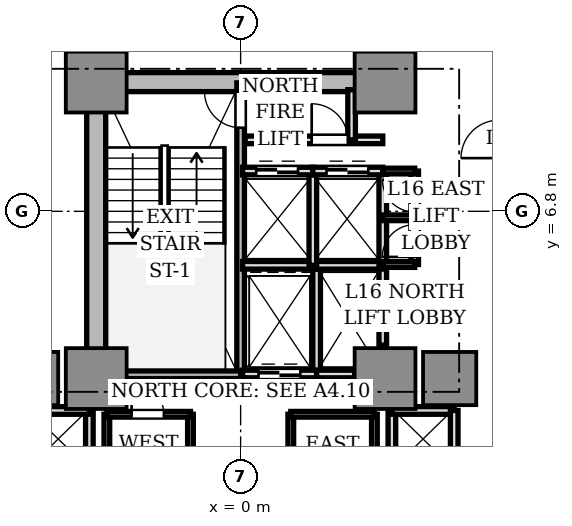
"""IFC4 building model, lengths in metres.
Left out: names, types, materials, properties, quantities, classifications, styles, units other than length and angle.
Written with IfcOpenShell. Run it as: python <this file> out.ifc"""

import sys

from ifc_helpers import new_model, si_unit, direction, frame, frame_2d, origin, origin_2d, place, context, subcontext, project, spatial, rectangle, extrude, source, transform, mapped, element, fill, save


model = new_model("IFC4")
c1 = context("Model", 3, precision=1e-05, world=origin(), true_north=direction((0.0, 1.0)))
c2 = subcontext(c1, "Body", "Model", "MODEL_VIEW")
j1 = project(units=[si_unit("LENGTHUNIT", "METRE"), si_unit("PLANEANGLEUNIT", "RADIAN")], contexts=[c1])
p1 = place(None, origin())
s1 = spatial("IfcSite", under=j1, at=p1, CompositionType="ELEMENT")
p2 = place(p1, origin())
s2 = spatial("IfcBuilding", under=s1, at=p2, CompositionType="ELEMENT")
p3 = place(p2, frame((0.0, 0.0, 61.1)))
s3 = spatial("IfcBuildingStorey", under=s2, at=p3, CompositionType="ELEMENT", Elevation=61.1)
p4 = place(p3, frame((-3.55, 10.2, 0.0), z_axis=(0.0, 0.0, 1.0), x_axis=(1.0, 0.0, 0.0)))
e1 = element("IfcWall", 1, at=p4, inside=s3, PredefinedType="SHEAR", context=c2, shape_type="SweptSolid", body=[
    extrude(rectangle(XDim=7.1, YDim=0.5, at=frame_2d((3.55, 0.0))), origin(), (0.0, 0.0, 1.0), 3.11),
])
p5 = place(p3, frame((-3.8, 2.85, 0.0), z_axis=(0.0, 0.0, 1.0), x_axis=(0.0, 1.0, 0.0)))
e2 = element("IfcWall", 2, at=p5, inside=s3, PredefinedType="SHEAR", context=c2, shape_type="SweptSolid", body=[
    extrude(rectangle(XDim=6.9, YDim=0.5, at=frame_2d((3.45, 0.0))), origin(), (0.0, 0.0, 1.0), 3.11),
])
m1 = source(origin(), c2, "Body", "SweptSolid", [
    extrude(rectangle(XDim=1.6, YDim=1.6, at=origin_2d()), origin(), (0.0, 0.0, 1.0), 3.11),
])
for number, where, z_axis, x_axis in (
    (3, (-3.8, 2.4, 0.0), (0.0, 0.0, 1.0), (1.0, 0.0, 0.0)),
    (4, (3.8, 2.4, 0.0), (0.0, 0.0, 1.0), (1.0, 0.0, 0.0)),
    (5, (-3.8, 10.2, 0.0), (0.0, 0.0, 1.0), (1.0, 0.0, 0.0)),
    (6, (3.8, 10.2, 0.0), (0.0, 0.0, 1.0), (1.0, 0.0, 0.0)),
):
    element("IfcColumn", number, at=place(p3, frame(where, z_axis=z_axis, x_axis=x_axis)), inside=s3, PredefinedType="COLUMN", context=c2, shape_type="MappedRepresentation", body=[
        mapped(m1, transform((0.0, 0.0, 0.0), scale=1.0)),
    ])
m2 = source(origin(), c2, "Body", "SweptSolid", [
    extrude(rectangle(XDim=1.4, YDim=1.4, at=origin_2d()), origin(), (0.0, 0.0, 1.0), 3.11),
])
for number, where, z_axis, x_axis in (
    (7, (5.5, 2.4, 0.0), (0.0, 0.0, 1.0), (1.0, 0.0, 0.0)),
    (8, (-5.5, 2.4, 0.0), (0.0, 0.0, 1.0), (1.0, 0.0, 0.0)),
):
    element("IfcColumn", number, at=place(p3, frame(where, z_axis=z_axis, x_axis=x_axis)), inside=s3, PredefinedType="COLUMN", context=c2, shape_type="MappedRepresentation", body=[
        mapped(m2, transform((0.0, 0.0, 0.0), scale=1.0)),
    ])
p6 = place(p3, frame((0.0, 2.5, 0.0), z_axis=(0.0, 0.0, 1.0), x_axis=(0.0, 1.0, 0.0)))
e9 = element("IfcWall", 9, at=p6, inside=s3, PredefinedType="SOLIDWALL", context=c2, shape_type="SweptSolid", body=[
    extrude(rectangle(XDim=7.68, YDim=0.2, at=frame_2d((3.84, 0.0))), origin(), (0.0, 0.0, 1.0), 3.11),
])
p7 = place(p6, frame((6.5, 0.0, 0.0)))
e10 = element("IfcOpeningElement", 10, at=p7, cuts=e9, PredefinedType="OPENING", context=c2, shape_type="SweptSolid", body=[
    extrude(rectangle(XDim=0.95, YDim=2.15, at=frame_2d((0.475, 1.075))), frame((0.0, 0.11, 0.0), z_axis=(0.0, -1.0, 0.0), x_axis=(1.0, 0.0, 0.0)), (0.0, 0.0, 1.0), 0.22),
])
p8 = place(p3, frame((-3.72, 2.5, 0.0), z_axis=(0.0, 0.0, 1.0), x_axis=(1.0, 0.0, 0.0)))
e11 = element("IfcWall", 11, at=p8, inside=s3, PredefinedType="SOLIDWALL", context=c2, shape_type="SweptSolid", body=[
    extrude(rectangle(XDim=3.72, YDim=0.2, at=frame_2d((1.86, 0.0))), origin(), (0.0, 0.0, 1.0), 3.11),
])
p9 = place(p3, frame((2.0, 2.5, 0.0), z_axis=(0.0, 0.0, 1.0), x_axis=(0.0, 1.0, 0.0)))
e12 = element("IfcWall", 12, at=p9, inside=s3, PredefinedType="SOLIDWALL", context=c2, shape_type="SweptSolid", body=[
    extrude(rectangle(XDim=2.78, YDim=0.2, at=frame_2d((1.39, 0.0))), origin(), (0.0, 0.0, 1.0), 2.66),
])
p10 = place(p3, frame((0.05, 2.52, 0.0), z_axis=(0.0, 0.0, 1.0), x_axis=(1.0, 0.0, 0.0)))
e13 = element("IfcWall", 13, at=p10, inside=s3, PredefinedType="SOLIDWALL", context=c2, shape_type="SweptSolid", body=[
    extrude(rectangle(XDim=1.95, YDim=0.2, at=frame_2d((0.975, 0.0))), origin(), (0.0, 0.0, 1.0), 2.66),
])
p11 = place(p10, frame((0.42, 0.0, 0.0)))
e14 = element("IfcOpeningElement", 14, at=p11, cuts=e13, PredefinedType="OPENING", context=c2, shape_type="SweptSolid", body=[
    extrude(rectangle(XDim=1.1, YDim=2.2, at=frame_2d((0.55, 1.1))), frame((0.0, 0.11, 0.0), z_axis=(0.0, -1.0, 0.0), x_axis=(1.0, 0.0, 0.0)), (0.0, 0.0, 1.0), 0.22),
])
p12 = place(p3, frame((2.0, 2.52, 0.0), z_axis=(0.0, 0.0, 1.0), x_axis=(1.0, 0.0, 0.0)))
e15 = element("IfcWall", 15, at=p12, inside=s3, PredefinedType="SOLIDWALL", context=c2, shape_type="SweptSolid", body=[
    extrude(rectangle(XDim=1.0, YDim=0.2, at=frame_2d((0.5, 0.0))), origin(), (0.0, 0.0, 1.0), 2.66),
])
p13 = place(p3, frame((3.74, 3.28, 0.0), z_axis=(0.0, 0.0, 1.0), x_axis=(0.0, 1.0, 0.0)))
e16 = element("IfcWall", 16, at=p13, inside=s3, PredefinedType="SOLIDWALL", context=c2, shape_type="SweptSolid", body=[
    extrude(rectangle(XDim=2.08, YDim=0.2, at=frame_2d((1.04, 0.0))), origin(), (0.0, 0.0, 1.0), 2.66),
])
p14 = place(p13, frame((0.44, 0.0, 0.0)))
e17 = element("IfcOpeningElement", 17, at=p14, cuts=e16, PredefinedType="OPENING", context=c2, shape_type="SweptSolid", body=[
    extrude(rectangle(XDim=1.2, YDim=2.2, at=frame_2d((0.6, 1.1))), frame((0.0, 0.11, 0.0), z_axis=(0.0, -1.0, 0.0), x_axis=(1.0, 0.0, 0.0)), (0.0, 0.0, 1.0), 0.22),
])
p15 = place(p3, frame((0.05, 5.38, 0.0), z_axis=(0.0, 0.0, 1.0), x_axis=(1.0, 0.0, 0.0)))
e18 = element("IfcWall", 18, at=p15, inside=s3, PredefinedType="SOLIDWALL", context=c2, shape_type="SweptSolid", body=[
    extrude(rectangle(XDim=3.69, YDim=0.2, at=frame_2d((1.845, 0.0))), origin(), (0.0, 0.0, 1.0), 2.66),
])
p16 = place(p3, frame((1.9, 5.38, 0.0), z_axis=(0.0, 0.0, 1.0), x_axis=(0.0, 1.0, 0.0)))
e19 = element("IfcWall", 19, at=p16, inside=s3, PredefinedType="SOLIDWALL", context=c2, shape_type="SweptSolid", body=[
    extrude(rectangle(XDim=2.48, YDim=0.2, at=frame_2d((1.24, 0.0))), origin(), (0.0, 0.0, 1.0), 2.66),
])
p17 = place(p3, frame((0.05, 7.86, 0.0), z_axis=(0.0, 0.0, 1.0), x_axis=(1.0, 0.0, 0.0)))
e20 = element("IfcWall", 20, at=p17, inside=s3, PredefinedType="SOLIDWALL", context=c2, shape_type="SweptSolid", body=[
    extrude(rectangle(XDim=1.85, YDim=0.2, at=frame_2d((0.925, 0.0))), origin(), (0.0, 0.0, 1.0), 2.66),
])
p18 = place(p17, frame((0.36, 0.0, 0.0)))
e21 = element("IfcOpeningElement", 21, at=p18, cuts=e20, PredefinedType="OPENING", context=c2, shape_type="SweptSolid", body=[
    extrude(rectangle(XDim=1.1, YDim=2.2, at=frame_2d((0.55, 1.1))), frame((0.0, 0.11, 0.0), z_axis=(0.0, -1.0, 0.0), x_axis=(1.0, 0.0, 0.0)), (0.0, 0.0, 1.0), 0.22),
])
p19 = place(p3, frame((3.74, 5.38, 0.0), z_axis=(0.0, 0.0, 1.0), x_axis=(0.0, 1.0, 0.0)))
e22 = element("IfcWall", 22, at=p19, inside=s3, PredefinedType="SOLIDWALL", context=c2, shape_type="SweptSolid", body=[
    extrude(rectangle(XDim=2.48, YDim=0.2, at=frame_2d((1.24, 0.0))), origin(), (0.0, 0.0, 1.0), 2.66),
])
p20 = place(p3, frame((1.9, 7.86, 0.0), z_axis=(0.0, 0.0, 1.0), x_axis=(1.0, 0.0, 0.0)))
e23 = element("IfcWall", 23, at=p20, inside=s3, PredefinedType="SOLIDWALL", context=c2, shape_type="SweptSolid", body=[
    extrude(rectangle(XDim=1.84, YDim=0.2, at=frame_2d((0.92, 0.0))), origin(), (0.0, 0.0, 1.0), 2.66),
])
p21 = place(p20, frame((0.36, 0.0, 0.0)))
e24 = element("IfcOpeningElement", 24, at=p21, cuts=e23, PredefinedType="OPENING", context=c2, shape_type="SweptSolid", body=[
    extrude(rectangle(XDim=1.1, YDim=2.2, at=frame_2d((0.55, 1.1))), frame((0.0, 0.11, 0.0), z_axis=(0.0, -1.0, 0.0), x_axis=(1.0, 0.0, 0.0)), (0.0, 0.0, 1.0), 0.22),
])
p22 = place(p3, frame((3.98, -1.56, 0.0), z_axis=(0.0, 0.0, 1.0), x_axis=(0.0, 1.0, 0.0)))
e25 = element("IfcWall", 25, at=p22, inside=s3, PredefinedType="SOLIDWALL", context=c2, shape_type="SweptSolid", body=[
    extrude(rectangle(XDim=3.12, YDim=0.2, at=frame_2d((1.56, 0.0))), origin(), (0.0, 0.0, 1.0), 2.18),
])
p23 = place(p3, frame((3.98, 1.56, 0.0), z_axis=(0.0, 0.0, 1.0), x_axis=(1.0, 0.0, 0.0)))
e26 = element("IfcWall", 26, at=p23, inside=s3, PredefinedType="SOLIDWALL", context=c2, shape_type="SweptSolid", body=[
    extrude(rectangle(XDim=1.64, YDim=0.2, at=frame_2d((0.82, 0.0))), origin(), (0.0, 0.0, 1.0), 2.66),
])
p24 = place(p3, frame((5.62, 0.0, 0.0), z_axis=(0.0, 0.0, 1.0), x_axis=(0.0, 1.0, 0.0)))
e27 = element("IfcWall", 27, at=p24, inside=s3, PredefinedType="SOLIDWALL", context=c2, shape_type="SweptSolid", body=[
    extrude(rectangle(XDim=1.56, YDim=0.2, at=frame_2d((0.78, 0.0))), origin(), (0.0, 0.0, 1.0), 2.66),
])
p25 = place(p3, frame((-3.98, -1.56, 0.0), z_axis=(0.0, 0.0, 1.0), x_axis=(0.0, 1.0, 0.0)))
e28 = element("IfcWall", 28, at=p25, inside=s3, PredefinedType="SOLIDWALL", context=c2, shape_type="SweptSolid", body=[
    extrude(rectangle(XDim=3.12, YDim=0.2, at=frame_2d((1.56, 0.0))), origin(), (0.0, 0.0, 1.0), 2.18),
])
p26 = place(p3, frame((-5.62, 1.56, 0.0), z_axis=(0.0, 0.0, 1.0), x_axis=(1.0, 0.0, 0.0)))
e29 = element("IfcWall", 29, at=p26, inside=s3, PredefinedType="SOLIDWALL", context=c2, shape_type="SweptSolid", body=[
    extrude(rectangle(XDim=1.64, YDim=0.2, at=frame_2d((0.82, 0.0))), origin(), (0.0, 0.0, 1.0), 2.66),
])
p27 = place(p3, frame((0.12, 8.68, 0.0), z_axis=(0.0, 0.0, 1.0), x_axis=(1.0, 0.0, 0.0)))
e30 = element("IfcWall", 30, at=p27, inside=s3, PredefinedType="SOLIDWALL", context=c2, shape_type="SweptSolid", body=[
    extrude(rectangle(XDim=3.62, YDim=0.2, at=frame_2d((1.81, 0.0))), origin(), (0.0, 0.0, 1.0), 2.66),
])
p28 = place(p27, frame((1.75, 0.0, 0.0)))
e31 = element("IfcOpeningElement", 31, at=p28, cuts=e30, PredefinedType="OPENING", context=c2, shape_type="SweptSolid", body=[
    extrude(rectangle(XDim=0.95, YDim=2.15, at=frame_2d((0.475, 1.075))), frame((0.0, 0.11, 0.0), z_axis=(0.0, -1.0, 0.0), x_axis=(1.0, 0.0, 0.0)), (0.0, 0.0, 1.0), 0.22),
])
p29 = place(p3, frame((2.92, 8.68, 0.0), z_axis=(0.0, 0.0, 1.0), x_axis=(0.0, 1.0, 0.0)))
e32 = element("IfcWall", 32, at=p29, inside=s3, PredefinedType="SOLIDWALL", context=c2, shape_type="SweptSolid", body=[
    extrude(rectangle(XDim=1.32, YDim=0.2, at=frame_2d((0.66, 0.0))), origin(), (0.0, 0.0, 1.0), 2.66),
])
p30 = place(p3, frame((4.58, 5.4, 0.0), z_axis=(0.0, 0.0, 1.0), x_axis=(0.0, 1.0, 0.0)))
e33 = element("IfcWall", 33, at=p30, inside=s3, PredefinedType="SOLIDWALL", context=c2, shape_type="SweptSolid", body=[
    extrude(rectangle(XDim=2.46, YDim=0.2, at=frame_2d((1.23, 0.0))), origin(), (0.0, 0.0, 1.0), 2.66),
])
p31 = place(p30, frame((0.2, 0.0, 0.0)))
e34 = element("IfcOpeningElement", 34, at=p31, cuts=e33, PredefinedType="OPENING", context=c2, shape_type="SweptSolid", body=[
    extrude(rectangle(XDim=0.85, YDim=2.1, at=frame_2d((0.425, 1.05))), frame((0.0, 0.11, 0.0), z_axis=(0.0, -1.0, 0.0), x_axis=(1.0, 0.0, 0.0)), (0.0, 0.0, 1.0), 0.22),
])
p32 = place(p30, frame((1.38, 0.0, 0.0)))
e35 = element("IfcOpeningElement", 35, at=p32, cuts=e33, PredefinedType="OPENING", context=c2, shape_type="SweptSolid", body=[
    extrude(rectangle(XDim=0.85, YDim=2.1, at=frame_2d((0.425, 1.05))), frame((0.0, 0.11, 0.0), z_axis=(0.0, -1.0, 0.0), x_axis=(1.0, 0.0, 0.0)), (0.0, 0.0, 1.0), 0.22),
])
for number, where, z_axis, x_axis in (
    (36, (3.74, 5.4, 0.0), (0.0, 0.0, 1.0), (1.0, 0.0, 0.0)),
    (37, (3.74, 7.86, 0.0), (0.0, 0.0, 1.0), (1.0, 0.0, 0.0)),
    (38, (3.74, 6.63, 0.0), (0.0, 0.0, 1.0), (1.0, 0.0, 0.0)),
):
    element("IfcWall", number, at=place(p3, frame(where, z_axis=z_axis, x_axis=x_axis)), inside=s3, PredefinedType="PARTITIONING", context=c2, shape_type="SweptSolid", body=[
        extrude(rectangle(XDim=0.84, YDim=0.15, at=frame_2d((0.42, 0.0))), origin(), (0.0, 0.0, 1.0), 2.66),
    ])
p33 = place(p3, frame((-1.32, -1.46, 0.0), z_axis=(0.0, 0.0, 1.0), x_axis=(0.0, 1.0, 0.0)))
e39 = element("IfcWall", 39, at=p33, inside=s3, PredefinedType="PARTITIONING", context=c2, shape_type="SweptSolid", body=[
    extrude(rectangle(XDim=2.92, YDim=0.15, at=frame_2d((1.46, 0.0))), origin(), (0.0, 0.0, 1.0), 2.66),
])
p34 = place(p3, frame((-3.52, -1.46, 0.0), z_axis=(0.0, 0.0, 1.0), x_axis=(0.0, 1.0, 0.0)))
e40 = element("IfcWall", 40, at=p34, inside=s3, PredefinedType="PARTITIONING", context=c2, shape_type="SweptSolid", body=[
    extrude(rectangle(XDim=2.92, YDim=0.15, at=frame_2d((1.46, 0.0))), origin(), (0.0, 0.0, 1.0), 2.18),
])
p35 = place(p3, frame((-3.52, 1.46, 0.0), z_axis=(0.0, 0.0, 1.0), x_axis=(1.0, 0.0, 0.0)))
e41 = element("IfcWall", 41, at=p35, inside=s3, PredefinedType="PARTITIONING", context=c2, shape_type="SweptSolid", body=[
    extrude(rectangle(XDim=2.2, YDim=0.15, at=frame_2d((1.1, 0.0))), origin(), (0.0, 0.0, 1.0), 2.66),
])
p36 = place(p35, frame((0.65, 0.0, 0.0)))
e42 = element("IfcOpeningElement", 42, at=p36, cuts=e41, PredefinedType="OPENING", context=c2, shape_type="SweptSolid", body=[
    extrude(rectangle(XDim=0.85, YDim=2.1, at=frame_2d((0.425, 1.05))), frame((0.0, 0.085, 0.0), z_axis=(0.0, -1.0, 0.0), x_axis=(1.0, 0.0, 0.0)), (0.0, 0.0, 1.0), 0.17),
])
p37 = place(p3, frame((1.32, -1.46, 0.0), z_axis=(0.0, 0.0, 1.0), x_axis=(0.0, 1.0, 0.0)))
e43 = element("IfcWall", 43, at=p37, inside=s3, PredefinedType="PARTITIONING", context=c2, shape_type="SweptSolid", body=[
    extrude(rectangle(XDim=2.92, YDim=0.15, at=frame_2d((1.46, 0.0))), origin(), (0.0, 0.0, 1.0), 2.66),
])
p38 = place(p3, frame((3.52, -1.46, 0.0), z_axis=(0.0, 0.0, 1.0), x_axis=(0.0, 1.0, 0.0)))
e44 = element("IfcWall", 44, at=p38, inside=s3, PredefinedType="PARTITIONING", context=c2, shape_type="SweptSolid", body=[
    extrude(rectangle(XDim=2.92, YDim=0.15, at=frame_2d((1.46, 0.0))), origin(), (0.0, 0.0, 1.0), 2.18),
])
p39 = place(p3, frame((1.32, 1.46, 0.0), z_axis=(0.0, 0.0, 1.0), x_axis=(1.0, 0.0, 0.0)))
e45 = element("IfcWall", 45, at=p39, inside=s3, PredefinedType="PARTITIONING", context=c2, shape_type="SweptSolid", body=[
    extrude(rectangle(XDim=2.2, YDim=0.15, at=frame_2d((1.1, 0.0))), origin(), (0.0, 0.0, 1.0), 2.66),
])
m3 = source(origin(), c2, "Body", "SweptSolid", [
    extrude(rectangle(XDim=1.1, YDim=0.05, at=origin_2d()), origin(), (0.0, 0.0, 1.0), 2.2),
])
p40 = place(p11, frame((0.55, 0.0, 0.0)))
e46 = element("IfcDoor", 46, at=p40, inside=s3, OperationType="DOUBLE_DOOR_SLIDING", PredefinedType="DOOR", context=c2, shape_type="MappedRepresentation", body=[
    mapped(m3, transform((0.0, 0.0, 0.0), scale=1.0)),
])
fill(e14, e46)
m4 = source(origin(), c2, "Body", "SweptSolid", [
    extrude(rectangle(XDim=1.2, YDim=0.05, at=origin_2d()), origin(), (0.0, 0.0, 1.0), 2.2),
])
p41 = place(p14, frame((0.6, 0.0, 0.0)))
e47 = element("IfcDoor", 47, at=p41, inside=s3, OperationType="DOUBLE_DOOR_SLIDING", PredefinedType="DOOR", context=c2, shape_type="MappedRepresentation", body=[
    mapped(m4, transform((0.0, 0.0, 0.0), scale=1.0)),
])
fill(e17, e47)
p42 = place(p18, frame((0.55, 0.0, 0.0)))
e48 = element("IfcDoor", 48, at=p42, inside=s3, OperationType="DOUBLE_DOOR_SLIDING", PredefinedType="DOOR", context=c2, shape_type="MappedRepresentation", body=[
    mapped(m3, transform((0.0, 0.0, 0.0), scale=1.0)),
])
fill(e21, e48)
p43 = place(p21, frame((0.55, 0.0, 0.0)))
e49 = element("IfcDoor", 49, at=p43, inside=s3, OperationType="DOUBLE_DOOR_SLIDING", PredefinedType="DOOR", context=c2, shape_type="MappedRepresentation", body=[
    mapped(m3, transform((0.0, 0.0, 0.0), scale=1.0)),
])
fill(e24, e49)
m5 = source(origin(), c2, "Body", "SweptSolid", [
    extrude(rectangle(XDim=0.95, YDim=0.05, at=origin_2d()), origin(), (0.0, 0.0, 1.0), 2.15),
])
p44 = place(p7, frame((0.475, 0.0, 0.0)))
e50 = element("IfcDoor", 50, at=p44, inside=s3, OperationType="SINGLE_SWING_RIGHT", PredefinedType="DOOR", context=c2, shape_type="MappedRepresentation", body=[
    mapped(m5, transform((0.0, 0.0, 0.0), scale=1.0)),
])
fill(e10, e50)
p45 = place(p28, frame((0.475, 0.0, 0.0)))
e51 = element("IfcDoor", 51, at=p45, inside=s3, OperationType="SINGLE_SWING_LEFT", PredefinedType="DOOR", context=c2, shape_type="MappedRepresentation", body=[
    mapped(m5, transform((0.0, 0.0, 0.0), scale=1.0)),
])
fill(e31, e51)
m6 = source(origin(), c2, "Body", "SweptSolid", [
    extrude(rectangle(XDim=0.85, YDim=0.05, at=origin_2d()), origin(), (0.0, 0.0, 1.0), 2.1),
])
p46 = place(p31, frame((0.425, 0.0, 0.0)))
e52 = element("IfcDoor", 52, at=p46, inside=s3, OperationType="SINGLE_SWING_LEFT", PredefinedType="DOOR", context=c2, shape_type="MappedRepresentation", body=[
    mapped(m6, transform((0.0, 0.0, 0.0), scale=1.0)),
])
fill(e34, e52)
p47 = place(p32, frame((0.425, 0.0, 0.0)))
e53 = element("IfcDoor", 53, at=p47, inside=s3, OperationType="SINGLE_SWING_RIGHT", PredefinedType="DOOR", context=c2, shape_type="MappedRepresentation", body=[
    mapped(m6, transform((0.0, 0.0, 0.0), scale=1.0)),
])
fill(e35, e53)
p48 = place(p36, frame((0.425, 0.0, 0.0)))
e54 = element("IfcDoor", 54, at=p48, inside=s3, OperationType="SINGLE_SWING_LEFT", PredefinedType="DOOR", context=c2, shape_type="MappedRepresentation", body=[
    mapped(m6, transform((0.0, 0.0, 0.0), scale=1.0)),
])
fill(e42, e54)
save(model, sys.argv[1])
